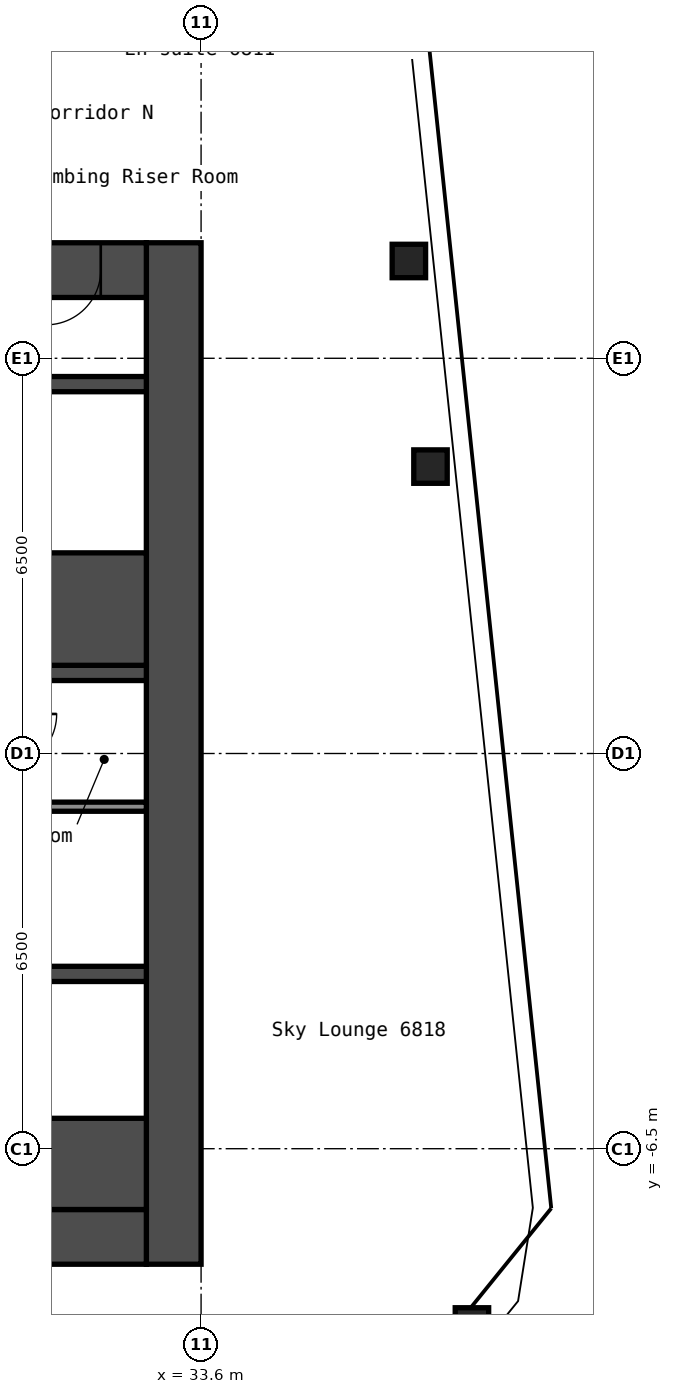
"""IFC4 building model, lengths in metres.
Left out: names, types, materials, properties, quantities, classifications, styles, units other than length and angle.
Written with IfcOpenShell. Run it as: python <this file> out.ifc"""

import sys

from ifc_helpers import new_model, si_unit, direction, frame, frame_2d, origin, origin_2d, place, context, subcontext, project, spatial, rectangle, hollow_rectangle, extrude, element, fill, save


model = new_model("IFC4")
c1 = context("Model", 3, precision=1e-05, world=origin(), true_north=direction((0.0, 1.0)))
c2 = subcontext(c1, "Body", "Model", "MODEL_VIEW")
j1 = project(units=[si_unit("LENGTHUNIT", "METRE"), si_unit("PLANEANGLEUNIT", "RADIAN")], contexts=[c1])
p1 = place(None, origin())
s1 = spatial("IfcSite", under=j1, at=p1, CompositionType="ELEMENT")
p2 = place(p1, origin())
s2 = spatial("IfcBuilding", under=s1, at=p2, CompositionType="ELEMENT")
p3 = place(p2, frame((0.0, 0.0, 242.2)))
s3 = spatial("IfcBuildingStorey", under=s2, at=p3, CompositionType="ELEMENT", Elevation=242.2)
for number, where, z_axis, x_axis in (
    (1, (38.054, -9.39, 0.0), (0.0, 0.0, 1.0), (1.0, 0.0, 0.0)),
    (2, (37.373, 4.719, 0.0), (0.0, 0.0, 1.0), (1.0, 0.0, 0.0)),
    (3, (37.017, 8.1, 0.0), (0.0, 0.0, 1.0), (1.0, 0.0, 0.0)),
):
    element("IfcColumn", number, at=place(p3, frame(where, z_axis=z_axis, x_axis=x_axis)), inside=s3, PredefinedType="COLUMN", context=c2, shape_type="SweptSolid", body=[
        extrude(hollow_rectangle(XDim=0.55, YDim=0.55, WallThickness=0.022, InnerFilletRadius=0.033, OuterFilletRadius=0.055, at=origin_2d()), origin(), (0.0, 0.0, 1.0), 2.75),
    ])
p4 = place(p3, frame((33.15, -8.4, 0.0), z_axis=(0.0, 0.0, 1.0), x_axis=(0.0, 1.0, 0.0)))
e4 = element("IfcWall", 4, at=p4, inside=s3, PredefinedType="SHEAR", context=c2, shape_type="SweptSolid", body=[
    extrude(rectangle(XDim=16.8, YDim=0.9, at=frame_2d((8.4, 0.0))), origin(), (0.0, 0.0, 1.0), 2.75),
])
p5 = place(p3, frame((17.7, 7.95, 0.0), z_axis=(0.0, 0.0, 1.0), x_axis=(1.0, 0.0, 0.0)))
e5 = element("IfcWall", 5, at=p5, inside=s3, PredefinedType="SHEAR", context=c2, shape_type="SweptSolid", body=[
    extrude(rectangle(XDim=15.0, YDim=0.9, at=frame_2d((7.5, 0.0))), origin(), (0.0, 0.0, 1.0), 2.75),
])
p6 = place(p5, frame((10.4, 0.0, 0.0)))
e6 = element("IfcOpeningElement", 6, at=p6, cuts=e5, PredefinedType="OPENING", context=c2, shape_type="SweptSolid", body=[
    extrude(rectangle(XDim=1.2, YDim=2.1, at=frame_2d((0.6, 1.05))), frame((0.0, 0.46, 0.0), z_axis=(0.0, -1.0, 0.0), x_axis=(1.0, 0.0, 0.0)), (0.0, 0.0, 1.0), 0.92),
])
p7 = place(p5, frame((13.35, 0.0, 0.0)))
e7 = element("IfcOpeningElement", 7, at=p7, cuts=e5, PredefinedType="OPENING", context=c2, shape_type="SweptSolid", body=[
    extrude(rectangle(XDim=0.9, YDim=2.1, at=frame_2d((0.45, 1.05))), frame((0.0, 0.46, 0.0), z_axis=(0.0, -1.0, 0.0), x_axis=(1.0, 0.0, 0.0)), (0.0, 0.0, 1.0), 0.92),
])
p8 = place(p3, frame((17.7, -7.95, 0.0), z_axis=(0.0, 0.0, 1.0), x_axis=(1.0, 0.0, 0.0)))
e8 = element("IfcWall", 8, at=p8, inside=s3, PredefinedType="SHEAR", context=c2, shape_type="SweptSolid", body=[
    extrude(rectangle(XDim=15.0, YDim=0.9, at=frame_2d((7.5, 0.0))), origin(), (0.0, 0.0, 1.0), 2.75),
])
p9 = place(p8, frame((2.55, 0.0, 0.0)))
e9 = element("IfcOpeningElement", 9, at=p9, cuts=e8, PredefinedType="OPENING", context=c2, shape_type="SweptSolid", body=[
    extrude(rectangle(XDim=1.0, YDim=2.1, at=frame_2d((0.5, 1.05))), frame((0.0, 0.46, 0.0), z_axis=(0.0, -1.0, 0.0), x_axis=(1.0, 0.0, 0.0)), (0.0, 0.0, 1.0), 0.92),
])
p10 = place(p3, frame((27.65, 1.325, 0.0), z_axis=(0.0, 0.0, 1.0), x_axis=(1.0, 0.0, 0.0)))
e10 = element("IfcWall", 10, at=p10, inside=s3, PredefinedType="SHEAR", context=c2, shape_type="SweptSolid", body=[
    extrude(rectangle(XDim=5.05, YDim=0.25, at=frame_2d((2.525, 0.0))), origin(), (0.0, 0.0, 1.0), 2.75),
])
p11 = place(p10, frame((0.55, 0.0, 0.0)))
e11 = element("IfcOpeningElement", 11, at=p11, cuts=e10, PredefinedType="OPENING", context=c2, shape_type="SweptSolid", body=[
    extrude(rectangle(XDim=1.2, YDim=2.1, at=frame_2d((0.6, 1.05))), frame((0.0, 0.135, 0.0), z_axis=(0.0, -1.0, 0.0), x_axis=(1.0, 0.0, 0.0)), (0.0, 0.0, 1.0), 0.27),
])
p12 = place(p3, frame((30.3, 2.375, 0.0), z_axis=(0.0, 0.0, 1.0), x_axis=(1.0, 0.0, 0.0)))
e12 = element("IfcWall", 12, at=p12, inside=s3, PredefinedType="SHEAR", context=c2, shape_type="SweptSolid", body=[
    extrude(rectangle(XDim=2.4, YDim=1.85, at=frame_2d((1.2, 0.0))), origin(), (0.0, 0.0, 1.0), 2.75),
])
p13 = place(p3, frame((30.3, 6.075, 0.0), z_axis=(0.0, 0.0, 1.0), x_axis=(1.0, 0.0, 0.0)))
e13 = element("IfcWall", 13, at=p13, inside=s3, PredefinedType="SHEAR", context=c2, shape_type="SweptSolid", body=[
    extrude(rectangle(XDim=2.4, YDim=0.25, at=frame_2d((1.2, 0.0))), origin(), (0.0, 0.0, 1.0), 2.75),
])
p14 = place(p3, frame((28.15, -3.625, 0.0), z_axis=(0.0, 0.0, 1.0), x_axis=(1.0, 0.0, 0.0)))
e14 = element("IfcWall", 14, at=p14, inside=s3, PredefinedType="SHEAR", context=c2, shape_type="SweptSolid", body=[
    extrude(rectangle(XDim=4.55, YDim=0.25, at=frame_2d((2.275, 0.0))), origin(), (0.0, 0.0, 1.0), 2.75),
])
p15 = place(p3, frame((28.15, -6.75, 0.0), z_axis=(0.0, 0.0, 1.0), x_axis=(1.0, 0.0, 0.0)))
e15 = element("IfcWall", 15, at=p15, inside=s3, PredefinedType="SHEAR", context=c2, shape_type="SweptSolid", body=[
    extrude(rectangle(XDim=4.55, YDim=1.5, at=frame_2d((2.275, 0.0))), origin(), (0.0, 0.0, 1.0), 2.75),
])
p16 = place(p3, frame((30.4, -0.875, 0.0), z_axis=(0.0, 0.0, 1.0), x_axis=(1.0, 0.0, 0.0)))
e16 = element("IfcWall", 16, at=p16, inside=s3, PredefinedType="PARTITIONING", context=c2, shape_type="SweptSolid", body=[
    extrude(rectangle(XDim=2.3, YDim=0.15, at=frame_2d((1.15, 0.0))), origin(), (0.0, 0.0, 1.0), 2.75),
])
p17 = place(p3, frame((16.048, 10.533, 0.0), z_axis=(0.0, 0.0, 1.0), x_axis=(0.994522460242, 0.104523088709, 0.0)))
e17 = element("IfcWall", 17, at=p17, inside=s3, PredefinedType="PARTITIONING", context=c2, shape_type="SweptSolid", body=[
    extrude(rectangle(XDim=21.3, YDim=0.2, at=frame_2d((10.65, 0.0))), origin(), (0.0, 0.0, 1.0), 2.75),
])
p18 = place(p17, frame((3.4, 0.0, 0.0)))
e18 = element("IfcOpeningElement", 18, at=p18, cuts=e17, PredefinedType="OPENING", context=c2, shape_type="SweptSolid", body=[
    extrude(rectangle(XDim=1.6, YDim=2.1, at=frame_2d((0.8, 1.05))), frame((0.0, 0.11, 0.0), z_axis=(0.0, -1.0, 0.0), x_axis=(1.0, 0.0, 0.0)), (0.0, 0.0, 1.0), 0.22),
])
p19 = place(p17, frame((11.8, 0.0, 0.0)))
e19 = element("IfcOpeningElement", 19, at=p19, cuts=e17, PredefinedType="OPENING", context=c2, shape_type="SweptSolid", body=[
    extrude(rectangle(XDim=1.6, YDim=2.1, at=frame_2d((0.8, 1.05))), frame((0.0, 0.11, 0.0), z_axis=(0.0, -1.0, 0.0), x_axis=(1.0, 0.0, 0.0)), (0.0, 0.0, 1.0), 0.22),
])
p20 = place(p17, frame((19.65, 0.0, 0.0)))
e20 = element("IfcOpeningElement", 20, at=p20, cuts=e17, PredefinedType="OPENING", context=c2, shape_type="SweptSolid", body=[
    extrude(rectangle(XDim=1.0, YDim=2.1, at=frame_2d((0.5, 1.05))), frame((0.0, 0.11, 0.0), z_axis=(0.0, -1.0, 0.0), x_axis=(1.0, 0.0, 0.0)), (0.0, 0.0, 1.0), 0.22),
])
p21 = place(p7, origin())
e21 = element("IfcDoor", 21, at=p21, inside=s3, OperationType="SINGLE_SWING_LEFT", PredefinedType="DOOR", context=c2, shape_type="SweptSolid", body=[
    extrude(rectangle(XDim=0.9, YDim=2.1, at=frame_2d((0.45, 1.05))), frame((0.0, 0.025, 0.0), z_axis=(0.0, -1.0, 0.0), x_axis=(1.0, 0.0, 0.0)), (0.0, 0.0, 1.0), 0.05),
])
fill(e7, e21)
save(model, sys.argv[1])
